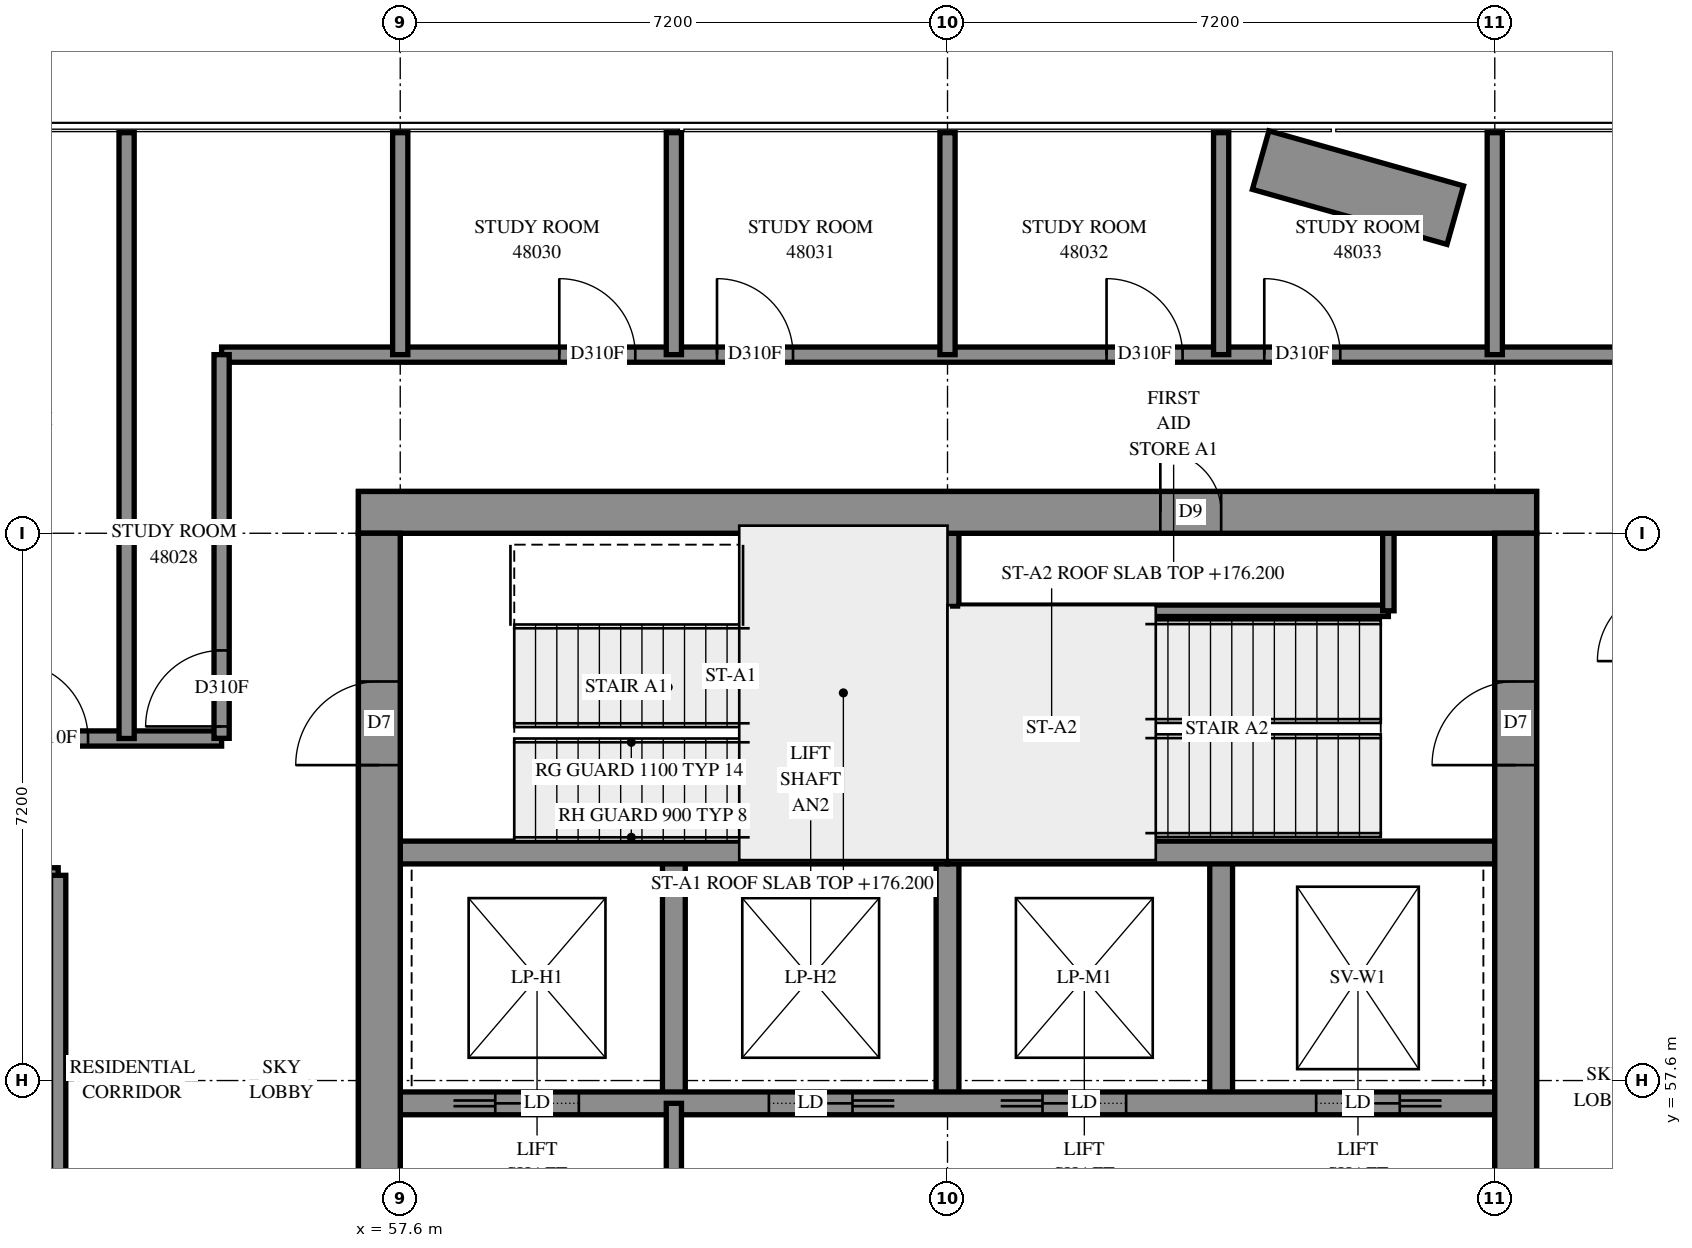
"""IFC4 building model, lengths in metres.
Left out: names, types, materials, properties, quantities, classifications, styles, units other than length and angle.
Written with IfcOpenShell. Run it as: python <this file> out.ifc"""

import sys

from ifc_helpers import new_model, si_unit, direction, frame, frame_2d, origin, place, context, subcontext, project, spatial, rectangle, extrude, element, fill, save


model = new_model("IFC4")
c1 = context("Model", 3, precision=1e-05, world=origin(), true_north=direction((0.0, 1.0)))
c2 = subcontext(c1, "Body", "Model", "MODEL_VIEW")
j1 = project(units=[si_unit("LENGTHUNIT", "METRE"), si_unit("PLANEANGLEUNIT", "RADIAN")], contexts=[c1])
p1 = place(None, origin())
s1 = spatial("IfcSite", under=j1, at=p1, CompositionType="ELEMENT")
p2 = place(p1, origin())
s2 = spatial("IfcBuilding", under=s1, at=p2, CompositionType="ELEMENT")
p3 = place(p2, frame((0.0, 0.0, 176.2)))
s3 = spatial("IfcBuildingStorey", under=s2, at=p3, CompositionType="ELEMENT", Elevation=176.2)
p4 = place(p3, frame((57.05, 65.075, -0.3), z_axis=(0.0, 0.0, 1.0), x_axis=(1.0, 0.0, 0.0)))
e1 = element("IfcWall", 1, at=p4, inside=s3, PredefinedType="SHEAR", context=c2, shape_type="SweptSolid", body=[
    extrude(rectangle(XDim=15.5, YDim=0.55, at=frame_2d((7.75, 0.0))), origin(), (0.0, 0.0, 1.0), 3.5),
])
p5 = place(p4, frame((10.55, 0.0, 0.3)))
e2 = element("IfcOpeningElement", 2, at=p5, cuts=e1, PredefinedType="OPENING", context=c2, shape_type="SweptSolid", body=[
    extrude(rectangle(XDim=0.8, YDim=2.1, at=frame_2d((0.4, 1.05))), frame((0.0, 0.285, 0.0), z_axis=(0.0, -1.0, 0.0), x_axis=(1.0, 0.0, 0.0)), (0.0, 0.0, 1.0), 0.57),
])
p6 = place(p3, frame((57.325, 50.4, -0.3), z_axis=(0.0, 0.0, 1.0), x_axis=(0.0, 1.0, 0.0)))
e3 = element("IfcWall", 3, at=p6, inside=s3, PredefinedType="SHEAR", context=c2, shape_type="SweptSolid", body=[
    extrude(rectangle(XDim=14.4, YDim=0.55, at=frame_2d((7.2, 0.0))), origin(), (0.0, 0.0, 1.0), 3.5),
])
p7 = place(p6, frame((4.55, 0.0, 0.3)))
e4 = element("IfcOpeningElement", 4, at=p7, cuts=e3, PredefinedType="OPENING", context=c2, shape_type="SweptSolid", body=[
    extrude(rectangle(XDim=1.1, YDim=2.1, at=frame_2d((0.55, 1.05))), frame((0.0, 0.285, 0.0), z_axis=(0.0, -1.0, 0.0), x_axis=(1.0, 0.0, 0.0)), (0.0, 0.0, 1.0), 0.57),
])
p8 = place(p6, frame((11.35, 0.0, 0.3)))
e5 = element("IfcOpeningElement", 5, at=p8, cuts=e3, PredefinedType="OPENING", context=c2, shape_type="SweptSolid", body=[
    extrude(rectangle(XDim=1.1, YDim=2.1, at=frame_2d((0.55, 1.05))), frame((0.0, 0.285, 0.0), z_axis=(0.0, -1.0, 0.0), x_axis=(1.0, 0.0, 0.0)), (0.0, 0.0, 1.0), 0.57),
])
p9 = place(p3, frame((72.275, 50.4, -0.3), z_axis=(0.0, 0.0, 1.0), x_axis=(0.0, 1.0, 0.0)))
e6 = element("IfcWall", 6, at=p9, inside=s3, PredefinedType="SHEAR", context=c2, shape_type="SweptSolid", body=[
    extrude(rectangle(XDim=14.4, YDim=0.55, at=frame_2d((7.2, 0.0))), origin(), (0.0, 0.0, 1.0), 3.5),
])
p10 = place(p9, frame((4.55, 0.0, 0.3)))
e7 = element("IfcOpeningElement", 7, at=p10, cuts=e6, PredefinedType="OPENING", context=c2, shape_type="SweptSolid", body=[
    extrude(rectangle(XDim=1.1, YDim=2.1, at=frame_2d((0.55, 1.05))), frame((0.0, 0.285, 0.0), z_axis=(0.0, -1.0, 0.0), x_axis=(1.0, 0.0, 0.0)), (0.0, 0.0, 1.0), 0.57),
])
p11 = place(p9, frame((11.35, 0.0, 0.3)))
e8 = element("IfcOpeningElement", 8, at=p11, cuts=e6, PredefinedType="OPENING", context=c2, shape_type="SweptSolid", body=[
    extrude(rectangle(XDim=1.1, YDim=2.1, at=frame_2d((0.55, 1.05))), frame((0.0, 0.285, 0.0), z_axis=(0.0, -1.0, 0.0), x_axis=(1.0, 0.0, 0.0)), (0.0, 0.0, 1.0), 0.57),
])
for number, where, z_axis, x_axis in (
    (9, (61.2, 57.3, 0.0), (0.0, 0.0, 1.0), (0.0, 1.0, 0.0)),
    (10, (64.8, 57.3, 0.0), (0.0, 0.0, 1.0), (0.0, 1.0, 0.0)),
    (11, (68.4, 57.3, 0.0), (0.0, 0.0, 1.0), (0.0, 1.0, 0.0)),
):
    element("IfcWall", number, at=place(p3, frame(where, z_axis=z_axis, x_axis=x_axis)), inside=s3, PredefinedType="SOLIDWALL", context=c2, shape_type="SweptSolid", body=[
        extrude(rectangle(XDim=3.3, YDim=0.3, at=frame_2d((1.65, 0.0))), origin(), (0.0, 0.0, 1.0), 3.9),
    ])
p12 = place(p3, frame((57.6, 57.3, 0.0), z_axis=(0.0, 0.0, 1.0), x_axis=(1.0, 0.0, 0.0)))
e12 = element("IfcWall", 12, at=p12, inside=s3, PredefinedType="SOLIDWALL", context=c2, shape_type="SweptSolid", body=[
    extrude(rectangle(XDim=14.4, YDim=0.3, at=frame_2d((7.2, 0.0))), origin(), (0.0, 0.0, 1.0), 3.9),
])
p13 = place(p12, frame((1.25, 0.0, 0.0)))
e13 = element("IfcOpeningElement", 13, at=p13, cuts=e12, PredefinedType="OPENING", context=c2, shape_type="SweptSolid", body=[
    extrude(rectangle(XDim=1.1, YDim=2.1, at=frame_2d((0.55, 1.05))), frame((0.0, 0.16, 0.0), z_axis=(0.0, -1.0, 0.0), x_axis=(1.0, 0.0, 0.0)), (0.0, 0.0, 1.0), 0.32),
])
p14 = place(p12, frame((4.85, 0.0, 0.0)))
e14 = element("IfcOpeningElement", 14, at=p14, cuts=e12, PredefinedType="OPENING", context=c2, shape_type="SweptSolid", body=[
    extrude(rectangle(XDim=1.1, YDim=2.1, at=frame_2d((0.55, 1.05))), frame((0.0, 0.16, 0.0), z_axis=(0.0, -1.0, 0.0), x_axis=(1.0, 0.0, 0.0)), (0.0, 0.0, 1.0), 0.32),
])
p15 = place(p12, frame((8.45, 0.0, 0.0)))
e15 = element("IfcOpeningElement", 15, at=p15, cuts=e12, PredefinedType="OPENING", context=c2, shape_type="SweptSolid", body=[
    extrude(rectangle(XDim=1.1, YDim=2.1, at=frame_2d((0.55, 1.05))), frame((0.0, 0.16, 0.0), z_axis=(0.0, -1.0, 0.0), x_axis=(1.0, 0.0, 0.0)), (0.0, 0.0, 1.0), 0.32),
])
p16 = place(p12, frame((12.05, 0.0, 0.0)))
e16 = element("IfcOpeningElement", 16, at=p16, cuts=e12, PredefinedType="OPENING", context=c2, shape_type="SweptSolid", body=[
    extrude(rectangle(XDim=1.1, YDim=2.1, at=frame_2d((0.55, 1.05))), frame((0.0, 0.16, 0.0), z_axis=(0.0, -1.0, 0.0), x_axis=(1.0, 0.0, 0.0)), (0.0, 0.0, 1.0), 0.32),
])
for number, where, z_axis, x_axis in (
    (17, (57.6, 60.6, 0.0), (0.0, 0.0, 1.0), (1.0, 0.0, 0.0)),
    (18, (64.8, 60.6, 0.0), (0.0, 0.0, 1.0), (1.0, 0.0, 0.0)),
):
    element("IfcWall", number, at=place(p3, frame(where, z_axis=z_axis, x_axis=x_axis)), inside=s3, PredefinedType="SOLIDWALL", context=c2, shape_type="SweptSolid", body=[
        extrude(rectangle(XDim=7.2, YDim=0.3, at=frame_2d((3.6, 0.0))), origin(), (0.0, 0.0, 1.0), 3.9),
    ])
p17 = place(p3, frame((64.8, 60.6, 0.0), z_axis=(0.0, 0.0, 1.0), x_axis=(0.0, 1.0, 0.0)))
e19 = element("IfcWall", 19, at=p17, inside=s3, PredefinedType="SOLIDWALL", context=c2, shape_type="SweptSolid", body=[
    extrude(rectangle(XDim=4.2, YDim=0.3, at=frame_2d((2.1, 0.0))), origin(), (0.0, 0.0, 1.0), 3.9),
])
p18 = place(p3, frame((71.48, 68.985, 0.0), z_axis=(0.0, 0.0, 1.0), x_axis=(-0.962258062, 0.2721386082, 0.0)))
e20 = element("IfcWall", 20, at=p18, inside=s3, PredefinedType="SOLIDWALL", context=c2, shape_type="SweptSolid", body=[
    extrude(rectangle(XDim=2.66, YDim=0.8, at=frame_2d((1.33, 0.0))), origin(), (0.0, 0.0, 1.0), 0.65),
])
p19 = place(p3, frame((64.95, 63.78, 0.0), z_axis=(0.0, 0.0, 1.0), x_axis=(1.0, 0.0, 0.0)))
e21 = element("IfcWall", 21, at=p19, inside=s3, PredefinedType="PARTITIONING", context=c2, shape_type="SweptSolid", body=[
    extrude(rectangle(XDim=5.65, YDim=0.15, at=frame_2d((2.825, 0.0))), origin(), (0.0, 0.0, 1.0), 3.9),
])
p20 = place(p3, frame((70.6, 63.78, 0.0), z_axis=(0.0, 0.0, 1.0), x_axis=(0.0, 1.0, 0.0)))
e22 = element("IfcWall", 22, at=p20, inside=s3, PredefinedType="PARTITIONING", context=c2, shape_type="SweptSolid", body=[
    extrude(rectangle(XDim=1.02, YDim=0.15, at=frame_2d((0.51, 0.0))), origin(), (0.0, 0.0, 1.0), 3.9),
])
p21 = place(p3, frame((61.2, 53.7, 0.0), z_axis=(0.0, 0.0, 1.0), x_axis=(0.0, 1.0, 0.0)))
e23 = element("IfcWall", 23, at=p21, inside=s3, PredefinedType="PARTITIONING", context=c2, shape_type="SweptSolid", body=[
    extrude(rectangle(XDim=3.6, YDim=0.2, at=frame_2d((1.8, 0.0))), origin(), (0.0, 0.0, 1.0), 3.9),
])
p22 = place(p3, frame((55.25, 67.15, 0.0), z_axis=(0.0, 0.0, 1.0), x_axis=(1.0, 0.0, 0.0)))
e24 = element("IfcWall", 24, at=p22, inside=s3, PredefinedType="PARTITIONING", context=c2, shape_type="SweptSolid", body=[
    extrude(rectangle(XDim=19.1, YDim=0.2, at=frame_2d((9.55, 0.0))), origin(), (0.0, 0.0, 1.0), 3.9),
])
p23 = place(p22, frame((4.442, 0.0, 0.0)))
e25 = element("IfcOpeningElement", 25, at=p23, cuts=e24, PredefinedType="OPENING", context=c2, shape_type="SweptSolid", body=[
    extrude(rectangle(XDim=1.0, YDim=2.1, at=frame_2d((0.5, 1.05))), frame((0.0, 0.11, 0.0), z_axis=(0.0, -1.0, 0.0), x_axis=(1.0, 0.0, 0.0)), (0.0, 0.0, 1.0), 0.22),
])
p24 = place(p22, frame((6.518, 0.0, 0.0)))
e26 = element("IfcOpeningElement", 26, at=p24, cuts=e24, PredefinedType="OPENING", context=c2, shape_type="SweptSolid", body=[
    extrude(rectangle(XDim=1.0, YDim=2.1, at=frame_2d((0.5, 1.05))), frame((0.0, 0.11, 0.0), z_axis=(0.0, -1.0, 0.0), x_axis=(1.0, 0.0, 0.0)), (0.0, 0.0, 1.0), 0.22),
])
p25 = place(p22, frame((11.643, 0.0, 0.0)))
e27 = element("IfcOpeningElement", 27, at=p25, cuts=e24, PredefinedType="OPENING", context=c2, shape_type="SweptSolid", body=[
    extrude(rectangle(XDim=1.0, YDim=2.1, at=frame_2d((0.5, 1.05))), frame((0.0, 0.11, 0.0), z_axis=(0.0, -1.0, 0.0), x_axis=(1.0, 0.0, 0.0)), (0.0, 0.0, 1.0), 0.22),
])
p26 = place(p22, frame((13.717, 0.0, 0.0)))
e28 = element("IfcOpeningElement", 28, at=p26, cuts=e24, PredefinedType="OPENING", context=c2, shape_type="SweptSolid", body=[
    extrude(rectangle(XDim=1.0, YDim=2.1, at=frame_2d((0.5, 1.05))), frame((0.0, 0.11, 0.0), z_axis=(0.0, -1.0, 0.0), x_axis=(1.0, 0.0, 0.0)), (0.0, 0.0, 1.0), 0.22),
])
p27 = place(p3, frame((37.93, 60.3, 0.0), z_axis=(0.0, 0.0, 1.0), x_axis=(1.0, 0.0, 0.0)))
e29 = element("IfcWall", 29, at=p27, inside=s3, PredefinedType="PARTITIONING", context=c2, shape_type="SweptSolid", body=[
    extrude(rectangle(XDim=15.17, YDim=0.2, at=frame_2d((7.585, 0.0))), origin(), (0.0, 0.0, 1.0), 3.9),
])
p28 = place(p27, frame((3.139, 0.0, 0.0)))
e30 = element("IfcOpeningElement", 30, at=p28, cuts=e29, PredefinedType="OPENING", context=c2, shape_type="SweptSolid", body=[
    extrude(rectangle(XDim=1.0, YDim=2.1, at=frame_2d((0.5, 1.05))), frame((0.0, 0.11, 0.0), z_axis=(0.0, -1.0, 0.0), x_axis=(1.0, 0.0, 0.0)), (0.0, 0.0, 1.0), 0.22),
])
p29 = place(p27, frame((9.705, 0.0, 0.0)))
e31 = element("IfcOpeningElement", 31, at=p29, cuts=e29, PredefinedType="OPENING", context=c2, shape_type="SweptSolid", body=[
    extrude(rectangle(XDim=1.0, YDim=2.1, at=frame_2d((0.5, 1.05))), frame((0.0, 0.11, 0.0), z_axis=(0.0, -1.0, 0.0), x_axis=(1.0, 0.0, 0.0)), (0.0, 0.0, 1.0), 0.22),
])
p30 = place(p27, frame((14.026, 0.0, 0.0)))
e32 = element("IfcOpeningElement", 32, at=p30, cuts=e29, PredefinedType="OPENING", context=c2, shape_type="SweptSolid", body=[
    extrude(rectangle(XDim=1.0, YDim=2.1, at=frame_2d((0.5, 1.05))), frame((0.0, 0.11, 0.0), z_axis=(0.0, -1.0, 0.0), x_axis=(1.0, 0.0, 0.0)), (0.0, 0.0, 1.0), 0.22),
])
p31 = place(p3, frame((40.502, 62.1, 0.0), z_axis=(0.0, 0.0, 1.0), x_axis=(1.0, 0.0, 0.0)))
e33 = element("IfcWall", 33, at=p31, inside=s3, PredefinedType="PARTITIONING", context=c2, shape_type="SweptSolid", body=[
    extrude(rectangle(XDim=14.748, YDim=0.2, at=frame_2d((7.374, 0.0))), origin(), (0.0, 0.0, 1.0), 3.9),
])
p32 = place(p31, frame((0.265, 0.0, 0.0)))
e34 = element("IfcOpeningElement", 34, at=p32, cuts=e33, PredefinedType="OPENING", context=c2, shape_type="SweptSolid", body=[
    extrude(rectangle(XDim=1.0, YDim=2.1, at=frame_2d((0.5, 1.05))), frame((0.0, 0.11, 0.0), z_axis=(0.0, -1.0, 0.0), x_axis=(1.0, 0.0, 0.0)), (0.0, 0.0, 1.0), 0.22),
])
p33 = place(p31, frame((6.561, 0.0, 0.0)))
e35 = element("IfcOpeningElement", 35, at=p33, cuts=e33, PredefinedType="OPENING", context=c2, shape_type="SweptSolid", body=[
    extrude(rectangle(XDim=1.0, YDim=2.1, at=frame_2d((0.5, 1.05))), frame((0.0, 0.11, 0.0), z_axis=(0.0, -1.0, 0.0), x_axis=(1.0, 0.0, 0.0)), (0.0, 0.0, 1.0), 0.22),
])
p34 = place(p31, frame((11.991, 0.0, 0.0)))
e36 = element("IfcOpeningElement", 36, at=p34, cuts=e33, PredefinedType="OPENING", context=c2, shape_type="SweptSolid", body=[
    extrude(rectangle(XDim=1.0, YDim=2.1, at=frame_2d((0.5, 1.05))), frame((0.0, 0.11, 0.0), z_axis=(0.0, -1.0, 0.0), x_axis=(1.0, 0.0, 0.0)), (0.0, 0.0, 1.0), 0.22),
])
p35 = place(p3, frame((54.0, 62.1, 0.0), z_axis=(0.0, 0.0, 1.0), x_axis=(0.0, 1.0, 0.0)))
e37 = element("IfcWall", 37, at=p35, inside=s3, PredefinedType="PARTITIONING", context=c2, shape_type="SweptSolid", body=[
    extrude(rectangle(XDim=7.97, YDim=0.2, at=frame_2d((3.985, 0.0))), origin(), (0.0, 0.0, 1.0), 3.9),
])
p36 = place(p3, frame((53.1, 54.902, 0.0), z_axis=(0.0, 0.0, 1.0), x_axis=(0.0, 1.0, 0.0)))
e38 = element("IfcWall", 38, at=p36, inside=s3, PredefinedType="PARTITIONING", context=c2, shape_type="SweptSolid", body=[
    extrude(rectangle(XDim=5.398, YDim=0.2, at=frame_2d((2.699, 0.0))), origin(), (0.0, 0.0, 1.0), 3.9),
])
p37 = place(p3, frame((55.25, 62.102, 0.0), z_axis=(0.0, 0.0, 1.0), x_axis=(0.0, 1.0, 0.0)))
e39 = element("IfcWall", 39, at=p37, inside=s3, PredefinedType="PARTITIONING", context=c2, shape_type="SweptSolid", body=[
    extrude(rectangle(XDim=5.048, YDim=0.2, at=frame_2d((2.524, 0.0))), origin(), (0.0, 0.0, 1.0), 3.9),
])
p38 = place(p37, frame((0.157, 0.0, 0.0)))
e40 = element("IfcOpeningElement", 40, at=p38, cuts=e39, PredefinedType="OPENING", context=c2, shape_type="SweptSolid", body=[
    extrude(rectangle(XDim=1.0, YDim=2.1, at=frame_2d((0.5, 1.05))), frame((0.0, 0.11, 0.0), z_axis=(0.0, -1.0, 0.0), x_axis=(1.0, 0.0, 0.0)), (0.0, 0.0, 1.0), 0.22),
])
for number, where, z_axis, x_axis in (
    (41, (57.6, 67.15, 0.0), (0.0, 0.0, 1.0), (0.0, 1.0, 0.0)),
    (42, (61.2, 67.15, 0.0), (0.0, 0.0, 1.0), (0.0, 1.0, 0.0)),
    (43, (64.8, 67.15, 0.0), (0.0, 0.0, 1.0), (0.0, 1.0, 0.0)),
    (44, (68.4, 67.15, 0.0), (0.0, 0.0, 1.0), (0.0, 1.0, 0.0)),
    (45, (72.0, 67.15, 0.0), (0.0, 0.0, 1.0), (0.0, 1.0, 0.0)),
):
    element("IfcWall", number, at=place(p3, frame(where, z_axis=z_axis, x_axis=x_axis)), inside=s3, PredefinedType="PARTITIONING", context=c2, shape_type="SweptSolid", body=[
        extrude(rectangle(XDim=2.92, YDim=0.2, at=frame_2d((1.46, 0.0))), origin(), (0.0, 0.0, 1.0), 3.9),
    ])
p39 = place(p5, origin())
e46 = element("IfcDoor", 46, at=p39, inside=s3, OperationType="SINGLE_SWING_RIGHT", PredefinedType="DOOR", context=c2, shape_type="SweptSolid", body=[
    extrude(rectangle(XDim=0.8, YDim=2.1, at=frame_2d((0.4, 1.05))), frame((0.0, 0.025, 0.0), z_axis=(0.0, -1.0, 0.0), x_axis=(1.0, 0.0, 0.0)), (0.0, 0.0, 1.0), 0.05),
])
fill(e2, e46)
p40 = place(p8, origin())
e47 = element("IfcDoor", 47, at=p40, inside=s3, OperationType="SINGLE_SWING_LEFT", PredefinedType="DOOR", context=c2, shape_type="SweptSolid", body=[
    extrude(rectangle(XDim=1.1, YDim=2.1, at=frame_2d((0.55, 1.05))), frame((0.0, 0.025, 0.0), z_axis=(0.0, -1.0, 0.0), x_axis=(1.0, 0.0, 0.0)), (0.0, 0.0, 1.0), 0.05),
])
fill(e5, e47)
p41 = place(p11, origin())
e48 = element("IfcDoor", 48, at=p41, inside=s3, OperationType="SINGLE_SWING_RIGHT", PredefinedType="DOOR", context=c2, shape_type="SweptSolid", body=[
    extrude(rectangle(XDim=1.1, YDim=2.1, at=frame_2d((0.55, 1.05))), frame((0.0, 0.025, 0.0), z_axis=(0.0, -1.0, 0.0), x_axis=(1.0, 0.0, 0.0)), (0.0, 0.0, 1.0), 0.05),
])
fill(e8, e48)
p42 = place(p13, origin())
e49 = element("IfcDoor", 49, at=p42, inside=s3, OperationType="SLIDING_TO_LEFT", PredefinedType="DOOR", context=c2, shape_type="SweptSolid", body=[
    extrude(rectangle(XDim=1.1, YDim=2.1, at=frame_2d((0.55, 1.05))), frame((0.0, 0.025, 0.0), z_axis=(0.0, -1.0, 0.0), x_axis=(1.0, 0.0, 0.0)), (0.0, 0.0, 1.0), 0.05),
])
fill(e13, e49)
p43 = place(p14, origin())
e50 = element("IfcDoor", 50, at=p43, inside=s3, OperationType="SLIDING_TO_RIGHT", PredefinedType="DOOR", context=c2, shape_type="SweptSolid", body=[
    extrude(rectangle(XDim=1.1, YDim=2.1, at=frame_2d((0.55, 1.05))), frame((0.0, 0.025, 0.0), z_axis=(0.0, -1.0, 0.0), x_axis=(1.0, 0.0, 0.0)), (0.0, 0.0, 1.0), 0.05),
])
fill(e14, e50)
p44 = place(p15, origin())
e51 = element("IfcDoor", 51, at=p44, inside=s3, OperationType="SLIDING_TO_LEFT", PredefinedType="DOOR", context=c2, shape_type="SweptSolid", body=[
    extrude(rectangle(XDim=1.1, YDim=2.1, at=frame_2d((0.55, 1.05))), frame((0.0, 0.025, 0.0), z_axis=(0.0, -1.0, 0.0), x_axis=(1.0, 0.0, 0.0)), (0.0, 0.0, 1.0), 0.05),
])
fill(e15, e51)
p45 = place(p16, origin())
e52 = element("IfcDoor", 52, at=p45, inside=s3, OperationType="SLIDING_TO_RIGHT", PredefinedType="DOOR", context=c2, shape_type="SweptSolid", body=[
    extrude(rectangle(XDim=1.1, YDim=2.1, at=frame_2d((0.55, 1.05))), frame((0.0, 0.025, 0.0), z_axis=(0.0, -1.0, 0.0), x_axis=(1.0, 0.0, 0.0)), (0.0, 0.0, 1.0), 0.05),
])
fill(e16, e52)
p46 = place(p34, origin())
e53 = element("IfcDoor", 53, at=p46, inside=s3, OperationType="SINGLE_SWING_RIGHT", PredefinedType="DOOR", context=c2, shape_type="SweptSolid", body=[
    extrude(rectangle(XDim=1.0, YDim=2.1, at=frame_2d((0.5, 1.05))), frame((0.0, 0.025, 0.0), z_axis=(0.0, -1.0, 0.0), x_axis=(1.0, 0.0, 0.0)), (0.0, 0.0, 1.0), 0.05),
])
fill(e36, e53)
p47 = place(p38, origin())
e54 = element("IfcDoor", 54, at=p47, inside=s3, OperationType="SINGLE_SWING_LEFT", PredefinedType="DOOR", context=c2, shape_type="SweptSolid", body=[
    extrude(rectangle(XDim=1.0, YDim=2.1, at=frame_2d((0.5, 1.05))), frame((0.0, 0.025, 0.0), z_axis=(0.0, -1.0, 0.0), x_axis=(1.0, 0.0, 0.0)), (0.0, 0.0, 1.0), 0.05),
])
fill(e40, e54)
p48 = place(p23, origin())
e55 = element("IfcDoor", 55, at=p48, inside=s3, OperationType="SINGLE_SWING_RIGHT", PredefinedType="DOOR", context=c2, shape_type="SweptSolid", body=[
    extrude(rectangle(XDim=1.0, YDim=2.1, at=frame_2d((0.5, 1.05))), frame((0.0, 0.025, 0.0), z_axis=(0.0, -1.0, 0.0), x_axis=(1.0, 0.0, 0.0)), (0.0, 0.0, 1.0), 0.05),
])
fill(e25, e55)
p49 = place(p24, origin())
e56 = element("IfcDoor", 56, at=p49, inside=s3, OperationType="SINGLE_SWING_LEFT", PredefinedType="DOOR", context=c2, shape_type="SweptSolid", body=[
    extrude(rectangle(XDim=1.0, YDim=2.1, at=frame_2d((0.5, 1.05))), frame((0.0, 0.025, 0.0), z_axis=(0.0, -1.0, 0.0), x_axis=(1.0, 0.0, 0.0)), (0.0, 0.0, 1.0), 0.05),
])
fill(e26, e56)
p50 = place(p25, origin())
e57 = element("IfcDoor", 57, at=p50, inside=s3, OperationType="SINGLE_SWING_RIGHT", PredefinedType="DOOR", context=c2, shape_type="SweptSolid", body=[
    extrude(rectangle(XDim=1.0, YDim=2.1, at=frame_2d((0.5, 1.05))), frame((0.0, 0.025, 0.0), z_axis=(0.0, -1.0, 0.0), x_axis=(1.0, 0.0, 0.0)), (0.0, 0.0, 1.0), 0.05),
])
fill(e27, e57)
p51 = place(p26, origin())
e58 = element("IfcDoor", 58, at=p51, inside=s3, OperationType="SINGLE_SWING_LEFT", PredefinedType="DOOR", context=c2, shape_type="SweptSolid", body=[
    extrude(rectangle(XDim=1.0, YDim=2.1, at=frame_2d((0.5, 1.05))), frame((0.0, 0.025, 0.0), z_axis=(0.0, -1.0, 0.0), x_axis=(1.0, 0.0, 0.0)), (0.0, 0.0, 1.0), 0.05),
])
fill(e28, e58)
save(model, sys.argv[1])
